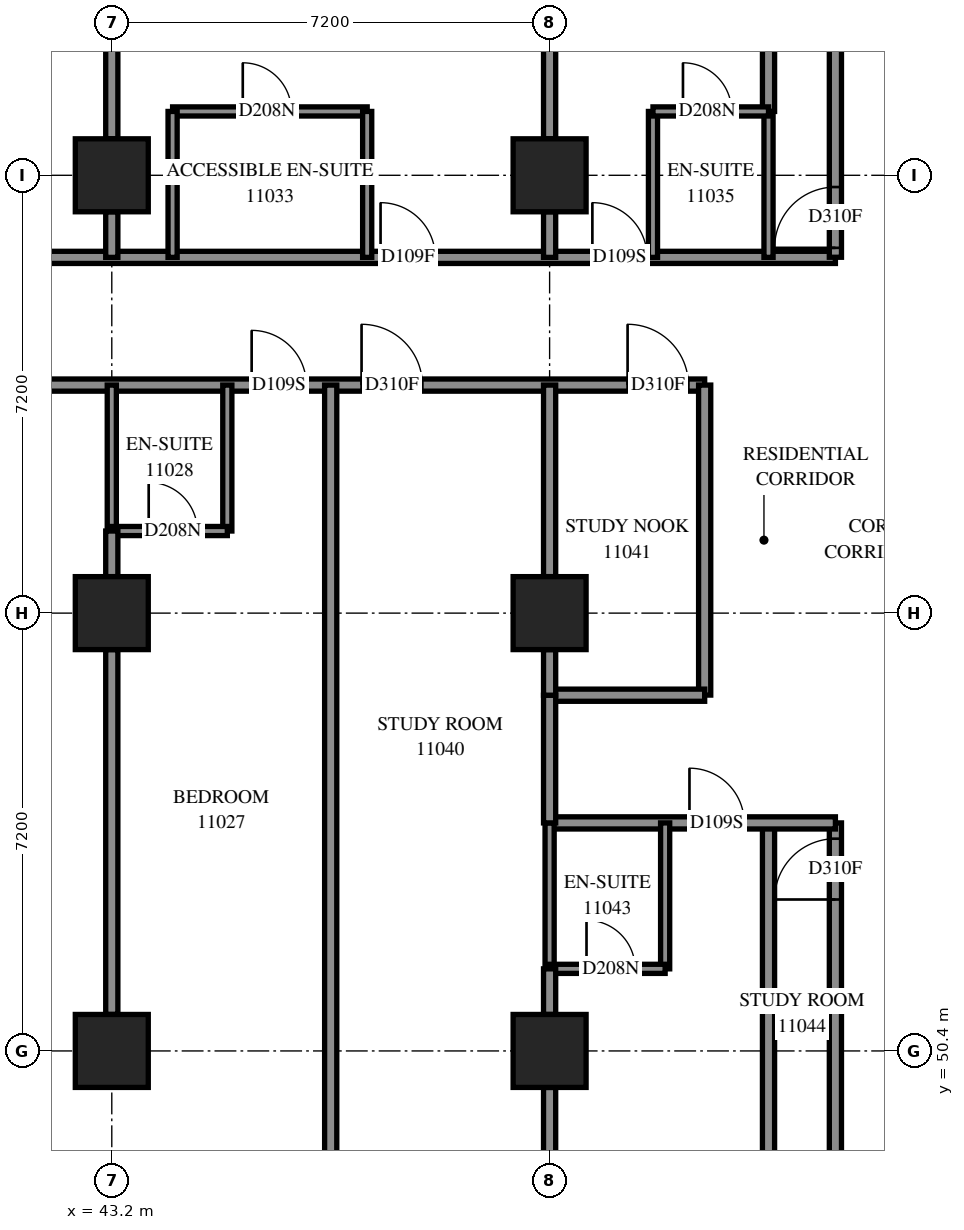
"""IFC4 building model, lengths in metres.
Left out: names, types, materials, properties, quantities, classifications, styles, units other than length and angle.
Written with IfcOpenShell. Run it as: python <this file> out.ifc"""

import sys

from ifc_helpers import new_model, si_unit, direction, frame, frame_2d, origin, origin_2d, place, context, subcontext, project, spatial, rectangle, extrude, element, fill, save


model = new_model("IFC4")
c1 = context("Model", 3, precision=1e-05, world=origin(), true_north=direction((0.0, 1.0)))
c2 = subcontext(c1, "Body", "Model", "MODEL_VIEW")
j1 = project(units=[si_unit("LENGTHUNIT", "METRE"), si_unit("PLANEANGLEUNIT", "RADIAN")], contexts=[c1])
p1 = place(None, origin())
s1 = spatial("IfcSite", under=j1, at=p1, CompositionType="ELEMENT")
p2 = place(p1, origin())
s2 = spatial("IfcBuilding", under=s1, at=p2, CompositionType="ELEMENT")
p3 = place(p2, frame((0.0, 0.0, 44.0)))
s3 = spatial("IfcBuildingStorey", under=s2, at=p3, CompositionType="ELEMENT", Elevation=44.0)
for number, where, z_axis, x_axis in (
    (1, (43.2, 50.4, 0.0), (0.0, 0.0, 1.0), (1.0, 0.0, 0.0)),
    (2, (43.2, 57.6, 0.0), (0.0, 0.0, 1.0), (1.0, 0.0, 0.0)),
    (3, (43.2, 64.8, 0.0), (0.0, 0.0, 1.0), (1.0, 0.0, 0.0)),
    (4, (50.4, 50.4, 0.0), (0.0, 0.0, 1.0), (1.0, 0.0, 0.0)),
    (5, (50.4, 57.6, 0.0), (0.0, 0.0, 1.0), (1.0, 0.0, 0.0)),
    (6, (50.4, 64.8, 0.0), (0.0, 0.0, 1.0), (1.0, 0.0, 0.0)),
):
    element("IfcColumn", number, at=place(p3, frame(where, z_axis=z_axis, x_axis=x_axis)), inside=s3, PredefinedType="COLUMN", context=c2, shape_type="SweptSolid", body=[
        extrude(rectangle(XDim=1.2, YDim=1.2, at=origin_2d()), origin(), (0.0, 0.0, 1.0), 3.1),
    ])
p4 = place(p3, frame((28.8, 61.35, 0.0), z_axis=(0.0, 0.0, 1.0), x_axis=(1.0, 0.0, 0.0)))
e7 = element("IfcWall", 7, at=p4, inside=s3, PredefinedType="PARTITIONING", context=c2, shape_type="SweptSolid", body=[
    extrude(rectangle(XDim=24.15, YDim=0.2, at=frame_2d((12.075, 0.0))), origin(), (0.0, 0.0, 1.0), 3.1),
])
p5 = place(p4, frame((2.3, 0.0, 0.0)))
e8 = element("IfcOpeningElement", 8, at=p5, cuts=e7, PredefinedType="OPENING", context=c2, shape_type="SweptSolid", body=[
    extrude(rectangle(XDim=0.9, YDim=2.1, at=frame_2d((0.45, 1.05))), frame((0.0, 0.11, 0.0), z_axis=(0.0, -1.0, 0.0), x_axis=(1.0, 0.0, 0.0)), (0.0, 0.0, 1.0), 0.22),
])
p6 = place(p4, frame((4.125, 0.0, 0.0)))
e9 = element("IfcOpeningElement", 9, at=p6, cuts=e7, PredefinedType="OPENING", context=c2, shape_type="SweptSolid", body=[
    extrude(rectangle(XDim=1.0, YDim=2.1, at=frame_2d((0.5, 1.05))), frame((0.0, 0.11, 0.0), z_axis=(0.0, -1.0, 0.0), x_axis=(1.0, 0.0, 0.0)), (0.0, 0.0, 1.0), 0.22),
])
p7 = place(p4, frame((11.061, 0.0, 0.0)))
e10 = element("IfcOpeningElement", 10, at=p7, cuts=e7, PredefinedType="OPENING", context=c2, shape_type="SweptSolid", body=[
    extrude(rectangle(XDim=0.9, YDim=2.1, at=frame_2d((0.45, 1.05))), frame((0.0, 0.11, 0.0), z_axis=(0.0, -1.0, 0.0), x_axis=(1.0, 0.0, 0.0)), (0.0, 0.0, 1.0), 0.22),
])
p8 = place(p4, frame((16.7, 0.0, 0.0)))
e11 = element("IfcOpeningElement", 11, at=p8, cuts=e7, PredefinedType="OPENING", context=c2, shape_type="SweptSolid", body=[
    extrude(rectangle(XDim=0.9, YDim=2.1, at=frame_2d((0.45, 1.05))), frame((0.0, 0.11, 0.0), z_axis=(0.0, -1.0, 0.0), x_axis=(1.0, 0.0, 0.0)), (0.0, 0.0, 1.0), 0.22),
])
p9 = place(p4, frame((18.508, 0.0, 0.0)))
e12 = element("IfcOpeningElement", 12, at=p9, cuts=e7, PredefinedType="OPENING", context=c2, shape_type="SweptSolid", body=[
    extrude(rectangle(XDim=1.0, YDim=2.1, at=frame_2d((0.5, 1.05))), frame((0.0, 0.11, 0.0), z_axis=(0.0, -1.0, 0.0), x_axis=(1.0, 0.0, 0.0)), (0.0, 0.0, 1.0), 0.22),
])
p10 = place(p4, frame((22.882, 0.0, 0.0)))
e13 = element("IfcOpeningElement", 13, at=p10, cuts=e7, PredefinedType="OPENING", context=c2, shape_type="SweptSolid", body=[
    extrude(rectangle(XDim=1.0, YDim=2.1, at=frame_2d((0.5, 1.05))), frame((0.0, 0.11, 0.0), z_axis=(0.0, -1.0, 0.0), x_axis=(1.0, 0.0, 0.0)), (0.0, 0.0, 1.0), 0.22),
])
p11 = place(p3, frame((33.452, 63.45, 0.0), z_axis=(0.0, 0.0, 1.0), x_axis=(1.0, 0.0, 0.0)))
e14 = element("IfcWall", 14, at=p11, inside=s3, PredefinedType="PARTITIONING", context=c2, shape_type="SweptSolid", body=[
    extrude(rectangle(XDim=21.648, YDim=0.2, at=frame_2d((10.824, 0.0))), origin(), (0.0, 0.0, 1.0), 3.1),
])
p12 = place(p11, frame((0.142, 0.0, 0.0)))
e15 = element("IfcOpeningElement", 15, at=p12, cuts=e14, PredefinedType="OPENING", context=c2, shape_type="SweptSolid", body=[
    extrude(rectangle(XDim=1.0, YDim=2.1, at=frame_2d((0.5, 1.05))), frame((0.0, 0.11, 0.0), z_axis=(0.0, -1.0, 0.0), x_axis=(1.0, 0.0, 0.0)), (0.0, 0.0, 1.0), 0.22),
])
p13 = place(p11, frame((6.412, 0.0, 0.0)))
e16 = element("IfcOpeningElement", 16, at=p13, cuts=e14, PredefinedType="OPENING", context=c2, shape_type="SweptSolid", body=[
    extrude(rectangle(XDim=0.9, YDim=2.1, at=frame_2d((0.45, 1.05))), frame((0.0, 0.11, 0.0), z_axis=(0.0, -1.0, 0.0), x_axis=(1.0, 0.0, 0.0)), (0.0, 0.0, 1.0), 0.22),
])
p14 = place(p11, frame((14.168, 0.0, 0.0)))
e17 = element("IfcOpeningElement", 17, at=p14, cuts=e14, PredefinedType="OPENING", context=c2, shape_type="SweptSolid", body=[
    extrude(rectangle(XDim=0.9, YDim=2.1, at=frame_2d((0.45, 1.05))), frame((0.0, 0.11, 0.0), z_axis=(0.0, -1.0, 0.0), x_axis=(1.0, 0.0, 0.0)), (0.0, 0.0, 1.0), 0.22),
])
p15 = place(p11, frame((17.651, 0.0, 0.0)))
e18 = element("IfcOpeningElement", 18, at=p15, cuts=e14, PredefinedType="OPENING", context=c2, shape_type="SweptSolid", body=[
    extrude(rectangle(XDim=0.9, YDim=2.1, at=frame_2d((0.45, 1.05))), frame((0.0, 0.11, 0.0), z_axis=(0.0, -1.0, 0.0), x_axis=(1.0, 0.0, 0.0)), (0.0, 0.0, 1.0), 0.22),
])
p16 = place(p3, frame((46.8, 48.699, 0.0), z_axis=(0.0, 0.0, 1.0), x_axis=(0.0, 1.0, 0.0)))
e19 = element("IfcWall", 19, at=p16, inside=s3, PredefinedType="PARTITIONING", context=c2, shape_type="SweptSolid", body=[
    extrude(rectangle(XDim=12.651, YDim=0.2, at=frame_2d((6.325, 0.0))), origin(), (0.0, 0.0, 1.0), 3.1),
])
p17 = place(p3, frame((54.0, 42.372, 0.0), z_axis=(0.0, 0.0, 1.0), x_axis=(0.0, 1.0, 0.0)))
e20 = element("IfcWall", 20, at=p17, inside=s3, PredefinedType="PARTITIONING", context=c2, shape_type="SweptSolid", body=[
    extrude(rectangle(XDim=11.778, YDim=0.2, at=frame_2d((5.889, 0.0))), origin(), (0.0, 0.0, 1.0), 3.1),
])
p18 = place(p3, frame((54.0, 65.85, 0.0), z_axis=(0.0, 0.0, 1.0), x_axis=(0.0, 1.0, 0.0)))
e21 = element("IfcWall", 21, at=p18, inside=s3, PredefinedType="PARTITIONING", context=c2, shape_type="SweptSolid", body=[
    extrude(rectangle(XDim=6.851, YDim=0.2, at=frame_2d((3.425, 0.0))), origin(), (0.0, 0.0, 1.0), 3.1),
])
p19 = place(p3, frame((55.1, 47.9, 0.0), z_axis=(0.0, 0.0, 1.0), x_axis=(0.0, 1.0, 0.0)))
e22 = element("IfcWall", 22, at=p19, inside=s3, PredefinedType="PARTITIONING", context=c2, shape_type="SweptSolid", body=[
    extrude(rectangle(XDim=6.25, YDim=0.2, at=frame_2d((3.125, 0.0))), origin(), (0.0, 0.0, 1.0), 3.1),
])
p20 = place(p19, frame((4.99, 0.0, 0.0)))
e23 = element("IfcOpeningElement", 23, at=p20, cuts=e22, PredefinedType="OPENING", context=c2, shape_type="SweptSolid", body=[
    extrude(rectangle(XDim=1.0, YDim=2.1, at=frame_2d((0.5, 1.05))), frame((0.0, 0.11, 0.0), z_axis=(0.0, -1.0, 0.0), x_axis=(1.0, 0.0, 0.0)), (0.0, 0.0, 1.0), 0.22),
])
p21 = place(p3, frame((43.2, 51.0, 0.0), z_axis=(0.0, 0.0, 1.0), x_axis=(0.0, 1.0, 0.0)))
e24 = element("IfcWall", 24, at=p21, inside=s3, PredefinedType="PARTITIONING", context=c2, shape_type="SweptSolid", body=[
    extrude(rectangle(XDim=6.0, YDim=0.2, at=frame_2d((3.0, 0.0))), origin(), (0.0, 0.0, 1.0), 2.6),
])
p22 = place(p3, frame((43.2, 65.4, 0.0), z_axis=(0.0, 0.0, 1.0), x_axis=(0.0, 1.0, 0.0)))
e25 = element("IfcWall", 25, at=p22, inside=s3, PredefinedType="PARTITIONING", context=c2, shape_type="SweptSolid", body=[
    extrude(rectangle(XDim=6.0, YDim=0.2, at=frame_2d((3.0, 0.0))), origin(), (0.0, 0.0, 1.0), 3.1),
])
p23 = place(p3, frame((50.4, 43.8, 0.0), z_axis=(0.0, 0.0, 1.0), x_axis=(0.0, 1.0, 0.0)))
e26 = element("IfcWall", 26, at=p23, inside=s3, PredefinedType="PARTITIONING", context=c2, shape_type="SweptSolid", body=[
    extrude(rectangle(XDim=6.0, YDim=0.2, at=frame_2d((3.0, 0.0))), origin(), (0.0, 0.0, 1.0), 2.6),
])
p24 = place(p3, frame((50.4, 65.4, 0.0), z_axis=(0.0, 0.0, 1.0), x_axis=(0.0, 1.0, 0.0)))
e27 = element("IfcWall", 27, at=p24, inside=s3, PredefinedType="PARTITIONING", context=c2, shape_type="SweptSolid", body=[
    extrude(rectangle(XDim=6.0, YDim=0.2, at=frame_2d((3.0, 0.0))), origin(), (0.0, 0.0, 1.0), 3.1),
])
p25 = place(p3, frame((52.95, 56.252, 0.0), z_axis=(0.0, 0.0, 1.0), x_axis=(0.0, 1.0, 0.0)))
e28 = element("IfcWall", 28, at=p25, inside=s3, PredefinedType="PARTITIONING", context=c2, shape_type="SweptSolid", body=[
    extrude(rectangle(XDim=5.098, YDim=0.2, at=frame_2d((2.549, 0.0))), origin(), (0.0, 0.0, 1.0), 3.1),
])
p26 = place(p3, frame((50.4, 54.15, 0.0), z_axis=(0.0, 0.0, 1.0), x_axis=(1.0, 0.0, 0.0)))
e29 = element("IfcWall", 29, at=p26, inside=s3, PredefinedType="PARTITIONING", context=c2, shape_type="SweptSolid", body=[
    extrude(rectangle(XDim=4.7, YDim=0.2, at=frame_2d((2.35, 0.0))), origin(), (0.0, 0.0, 1.0), 3.1),
])
p27 = place(p26, frame((2.3, 0.0, 0.0)))
e30 = element("IfcOpeningElement", 30, at=p27, cuts=e29, PredefinedType="OPENING", context=c2, shape_type="SweptSolid", body=[
    extrude(rectangle(XDim=0.9, YDim=2.1, at=frame_2d((0.45, 1.05))), frame((0.0, 0.11, 0.0), z_axis=(0.0, -1.0, 0.0), x_axis=(1.0, 0.0, 0.0)), (0.0, 0.0, 1.0), 0.22),
])
p28 = place(p3, frame((55.1, 63.452, 0.0), z_axis=(0.0, 0.0, 1.0), x_axis=(0.0, 1.0, 0.0)))
e31 = element("IfcWall", 31, at=p28, inside=s3, PredefinedType="PARTITIONING", context=c2, shape_type="SweptSolid", body=[
    extrude(rectangle(XDim=3.848, YDim=0.2, at=frame_2d((1.924, 0.0))), origin(), (0.0, 0.0, 1.0), 3.1),
])
p29 = place(p28, frame((0.155, 0.0, 0.0)))
e32 = element("IfcOpeningElement", 32, at=p29, cuts=e31, PredefinedType="OPENING", context=c2, shape_type="SweptSolid", body=[
    extrude(rectangle(XDim=1.0, YDim=2.1, at=frame_2d((0.5, 1.05))), frame((0.0, 0.11, 0.0), z_axis=(0.0, -1.0, 0.0), x_axis=(1.0, 0.0, 0.0)), (0.0, 0.0, 1.0), 0.22),
])
p30 = place(p3, frame((44.2, 65.85, 0.0), z_axis=(0.0, 0.0, 1.0), x_axis=(1.0, 0.0, 0.0)))
e33 = element("IfcWall", 33, at=p30, inside=s3, PredefinedType="PARTITIONING", context=c2, shape_type="SweptSolid", body=[
    extrude(rectangle(XDim=3.2, YDim=0.15, at=frame_2d((1.6, 0.0))), origin(), (0.0, 0.0, 1.0), 3.1),
])
p31 = place(p30, frame((1.154, 0.0, 0.0)))
e34 = element("IfcOpeningElement", 34, at=p31, cuts=e33, PredefinedType="OPENING", context=c2, shape_type="SweptSolid", body=[
    extrude(rectangle(XDim=0.8, YDim=2.1, at=frame_2d((0.4, 1.05))), frame((0.0, 0.085, 0.0), z_axis=(0.0, -1.0, 0.0), x_axis=(1.0, 0.0, 0.0)), (0.0, 0.0, 1.0), 0.17),
])
p32 = place(p3, frame((50.4, 58.2, 0.0), z_axis=(0.0, 0.0, 1.0), x_axis=(0.0, 1.0, 0.0)))
e35 = element("IfcWall", 35, at=p32, inside=s3, PredefinedType="PARTITIONING", context=c2, shape_type="SweptSolid", body=[
    extrude(rectangle(XDim=3.15, YDim=0.2, at=frame_2d((1.575, 0.0))), origin(), (0.0, 0.0, 1.0), 3.1),
])
p33 = place(p3, frame((50.4, 56.25, 0.0), z_axis=(0.0, 0.0, 1.0), x_axis=(1.0, 0.0, 0.0)))
e36 = element("IfcWall", 36, at=p33, inside=s3, PredefinedType="PARTITIONING", context=c2, shape_type="SweptSolid", body=[
    extrude(rectangle(XDim=2.55, YDim=0.2, at=frame_2d((1.275, 0.0))), origin(), (0.0, 0.0, 1.0), 3.1),
])
for number, where, z_axis, x_axis in (
    (37, (45.1, 58.95, 0.0), (0.0, 0.0, 1.0), (0.0, 1.0, 0.0)),
    (38, (43.2, 58.95, 0.0), (0.0, 0.0, 1.0), (0.0, 1.0, 0.0)),
    (39, (52.3, 51.75, 0.0), (0.0, 0.0, 1.0), (0.0, 1.0, 0.0)),
    (40, (50.4, 51.75, 0.0), (0.0, 0.0, 1.0), (0.0, 1.0, 0.0)),
    (41, (44.2, 63.45, 0.0), (0.0, 0.0, 1.0), (0.0, 1.0, 0.0)),
    (42, (47.4, 63.45, 0.0), (0.0, 0.0, 1.0), (0.0, 1.0, 0.0)),
    (43, (52.1, 63.45, 0.0), (0.0, 0.0, 1.0), (0.0, 1.0, 0.0)),
    (44, (54.0, 63.45, 0.0), (0.0, 0.0, 1.0), (0.0, 1.0, 0.0)),
):
    element("IfcWall", number, at=place(p3, frame(where, z_axis=z_axis, x_axis=x_axis)), inside=s3, PredefinedType="PARTITIONING", context=c2, shape_type="SweptSolid", body=[
        extrude(rectangle(XDim=2.4, YDim=0.15, at=frame_2d((1.2, 0.0))), origin(), (0.0, 0.0, 1.0), 3.1),
    ])
p34 = place(p3, frame((50.4, 54.15, 0.0), z_axis=(0.0, 0.0, 1.0), x_axis=(0.0, 1.0, 0.0)))
e45 = element("IfcWall", 45, at=p34, inside=s3, PredefinedType="PARTITIONING", context=c2, shape_type="SweptSolid", body=[
    extrude(rectangle(XDim=2.1, YDim=0.2, at=frame_2d((1.05, 0.0))), origin(), (0.0, 0.0, 1.0), 3.1),
])
p35 = place(p3, frame((43.2, 58.95, 0.0), z_axis=(0.0, 0.0, 1.0), x_axis=(1.0, 0.0, 0.0)))
e46 = element("IfcWall", 46, at=p35, inside=s3, PredefinedType="PARTITIONING", context=c2, shape_type="SweptSolid", body=[
    extrude(rectangle(XDim=1.9, YDim=0.15, at=frame_2d((0.95, 0.0))), origin(), (0.0, 0.0, 1.0), 3.1),
])
p36 = place(p35, frame((0.607, 0.0, 0.0)))
e47 = element("IfcOpeningElement", 47, at=p36, cuts=e46, PredefinedType="OPENING", context=c2, shape_type="SweptSolid", body=[
    extrude(rectangle(XDim=0.8, YDim=2.1, at=frame_2d((0.4, 1.05))), frame((0.0, 0.085, 0.0), z_axis=(0.0, -1.0, 0.0), x_axis=(1.0, 0.0, 0.0)), (0.0, 0.0, 1.0), 0.17),
])
p37 = place(p3, frame((52.1, 65.85, 0.0), z_axis=(0.0, 0.0, 1.0), x_axis=(1.0, 0.0, 0.0)))
e48 = element("IfcWall", 48, at=p37, inside=s3, PredefinedType="PARTITIONING", context=c2, shape_type="SweptSolid", body=[
    extrude(rectangle(XDim=1.9, YDim=0.15, at=frame_2d((0.95, 0.0))), origin(), (0.0, 0.0, 1.0), 3.1),
])
p38 = place(p37, frame((0.493, 0.0, 0.0)))
e49 = element("IfcOpeningElement", 49, at=p38, cuts=e48, PredefinedType="OPENING", context=c2, shape_type="SweptSolid", body=[
    extrude(rectangle(XDim=0.8, YDim=2.1, at=frame_2d((0.4, 1.05))), frame((0.0, 0.085, 0.0), z_axis=(0.0, -1.0, 0.0), x_axis=(1.0, 0.0, 0.0)), (0.0, 0.0, 1.0), 0.17),
])
p39 = place(p3, frame((50.4, 51.75, 0.0), z_axis=(0.0, 0.0, 1.0), x_axis=(1.0, 0.0, 0.0)))
e50 = element("IfcWall", 50, at=p39, inside=s3, PredefinedType="PARTITIONING", context=c2, shape_type="SweptSolid", body=[
    extrude(rectangle(XDim=1.9, YDim=0.15, at=frame_2d((0.95, 0.0))), origin(), (0.0, 0.0, 1.0), 3.1),
])
p40 = place(p39, frame((0.607, 0.0, 0.0)))
e51 = element("IfcOpeningElement", 51, at=p40, cuts=e50, PredefinedType="OPENING", context=c2, shape_type="SweptSolid", body=[
    extrude(rectangle(XDim=0.8, YDim=2.1, at=frame_2d((0.4, 1.05))), frame((0.0, 0.085, 0.0), z_axis=(0.0, -1.0, 0.0), x_axis=(1.0, 0.0, 0.0)), (0.0, 0.0, 1.0), 0.17),
])
for number, where, z_axis, x_axis in (
    (52, (43.2, 58.2, 0.0), (0.0, 0.0, 1.0), (0.0, 1.0, 0.0)),
    (53, (43.2, 63.45, 0.0), (0.0, 0.0, 1.0), (0.0, 1.0, 0.0)),
    (54, (50.4, 51.0, 0.0), (0.0, 0.0, 1.0), (0.0, 1.0, 0.0)),
    (55, (50.4, 56.25, 0.0), (0.0, 0.0, 1.0), (0.0, 1.0, 0.0)),
    (56, (50.4, 63.45, 0.0), (0.0, 0.0, 1.0), (0.0, 1.0, 0.0)),
):
    element("IfcWall", number, at=place(p3, frame(where, z_axis=z_axis, x_axis=x_axis)), inside=s3, PredefinedType="PARTITIONING", context=c2, shape_type="SweptSolid", body=[
        extrude(rectangle(XDim=0.75, YDim=0.2, at=frame_2d((0.375, 0.0))), origin(), (0.0, 0.0, 1.0), 3.1),
    ])
p41 = place(p8, origin())
e57 = element("IfcDoor", 57, at=p41, inside=s3, OperationType="SINGLE_SWING_LEFT", PredefinedType="DOOR", context=c2, shape_type="SweptSolid", body=[
    extrude(rectangle(XDim=0.9, YDim=2.1, at=frame_2d((0.45, 1.05))), frame((0.0, 0.025, 0.0), z_axis=(0.0, -1.0, 0.0), x_axis=(1.0, 0.0, 0.0)), (0.0, 0.0, 1.0), 0.05),
])
fill(e11, e57)
p42 = place(p36, origin())
e58 = element("IfcDoor", 58, at=p42, inside=s3, OperationType="SINGLE_SWING_RIGHT", PredefinedType="DOOR", context=c2, shape_type="SweptSolid", body=[
    extrude(rectangle(XDim=0.8, YDim=2.1, at=frame_2d((0.4, 1.05))), frame((0.0, 0.025, 0.0), z_axis=(0.0, -1.0, 0.0), x_axis=(1.0, 0.0, 0.0)), (0.0, 0.0, 1.0), 0.05),
])
fill(e47, e58)
p43 = place(p14, origin())
e59 = element("IfcDoor", 59, at=p43, inside=s3, OperationType="SINGLE_SWING_RIGHT", PredefinedType="DOOR", context=c2, shape_type="SweptSolid", body=[
    extrude(rectangle(XDim=0.9, YDim=2.1, at=frame_2d((0.45, 1.05))), frame((0.0, 0.025, 0.0), z_axis=(0.0, -1.0, 0.0), x_axis=(1.0, 0.0, 0.0)), (0.0, 0.0, 1.0), 0.05),
])
fill(e17, e59)
p44 = place(p31, origin())
e60 = element("IfcDoor", 60, at=p44, inside=s3, OperationType="SINGLE_SWING_RIGHT", PredefinedType="DOOR", context=c2, shape_type="SweptSolid", body=[
    extrude(rectangle(XDim=0.8, YDim=2.1, at=frame_2d((0.4, 1.05))), frame((0.0, 0.025, 0.0), z_axis=(0.0, -1.0, 0.0), x_axis=(1.0, 0.0, 0.0)), (0.0, 0.0, 1.0), 0.05),
])
fill(e34, e60)
p45 = place(p15, origin())
e61 = element("IfcDoor", 61, at=p45, inside=s3, OperationType="SINGLE_SWING_RIGHT", PredefinedType="DOOR", context=c2, shape_type="SweptSolid", body=[
    extrude(rectangle(XDim=0.9, YDim=2.1, at=frame_2d((0.45, 1.05))), frame((0.0, 0.025, 0.0), z_axis=(0.0, -1.0, 0.0), x_axis=(1.0, 0.0, 0.0)), (0.0, 0.0, 1.0), 0.05),
])
fill(e18, e61)
p46 = place(p38, origin())
e62 = element("IfcDoor", 62, at=p46, inside=s3, OperationType="SINGLE_SWING_RIGHT", PredefinedType="DOOR", context=c2, shape_type="SweptSolid", body=[
    extrude(rectangle(XDim=0.8, YDim=2.1, at=frame_2d((0.4, 1.05))), frame((0.0, 0.025, 0.0), z_axis=(0.0, -1.0, 0.0), x_axis=(1.0, 0.0, 0.0)), (0.0, 0.0, 1.0), 0.05),
])
fill(e49, e62)
p47 = place(p29, origin())
e63 = element("IfcDoor", 63, at=p47, inside=s3, OperationType="SINGLE_SWING_LEFT", PredefinedType="DOOR", context=c2, shape_type="SweptSolid", body=[
    extrude(rectangle(XDim=1.0, YDim=2.1, at=frame_2d((0.5, 1.05))), frame((0.0, 0.025, 0.0), z_axis=(0.0, -1.0, 0.0), x_axis=(1.0, 0.0, 0.0)), (0.0, 0.0, 1.0), 0.05),
])
fill(e32, e63)
p48 = place(p9, origin())
e64 = element("IfcDoor", 64, at=p48, inside=s3, OperationType="SINGLE_SWING_RIGHT", PredefinedType="DOOR", context=c2, shape_type="SweptSolid", body=[
    extrude(rectangle(XDim=1.0, YDim=2.1, at=frame_2d((0.5, 1.05))), frame((0.0, 0.025, 0.0), z_axis=(0.0, -1.0, 0.0), x_axis=(1.0, 0.0, 0.0)), (0.0, 0.0, 1.0), 0.05),
])
fill(e12, e64)
p49 = place(p10, origin())
e65 = element("IfcDoor", 65, at=p49, inside=s3, OperationType="SINGLE_SWING_LEFT", PredefinedType="DOOR", context=c2, shape_type="SweptSolid", body=[
    extrude(rectangle(XDim=1.0, YDim=2.1, at=frame_2d((0.5, 1.05))), frame((0.0, 0.025, 0.0), z_axis=(0.0, -1.0, 0.0), x_axis=(1.0, 0.0, 0.0)), (0.0, 0.0, 1.0), 0.05),
])
fill(e13, e65)
p50 = place(p27, origin())
e66 = element("IfcDoor", 66, at=p50, inside=s3, OperationType="SINGLE_SWING_LEFT", PredefinedType="DOOR", context=c2, shape_type="SweptSolid", body=[
    extrude(rectangle(XDim=0.9, YDim=2.1, at=frame_2d((0.45, 1.05))), frame((0.0, 0.025, 0.0), z_axis=(0.0, -1.0, 0.0), x_axis=(1.0, 0.0, 0.0)), (0.0, 0.0, 1.0), 0.05),
])
fill(e30, e66)
p51 = place(p40, origin())
e67 = element("IfcDoor", 67, at=p51, inside=s3, OperationType="SINGLE_SWING_RIGHT", PredefinedType="DOOR", context=c2, shape_type="SweptSolid", body=[
    extrude(rectangle(XDim=0.8, YDim=2.1, at=frame_2d((0.4, 1.05))), frame((0.0, 0.025, 0.0), z_axis=(0.0, -1.0, 0.0), x_axis=(1.0, 0.0, 0.0)), (0.0, 0.0, 1.0), 0.05),
])
fill(e51, e67)
p52 = place(p20, origin())
e68 = element("IfcDoor", 68, at=p52, inside=s3, OperationType="SINGLE_SWING_RIGHT", PredefinedType="DOOR", context=c2, shape_type="SweptSolid", body=[
    extrude(rectangle(XDim=1.0, YDim=2.1, at=frame_2d((0.5, 1.05))), frame((0.0, 0.025, 0.0), z_axis=(0.0, -1.0, 0.0), x_axis=(1.0, 0.0, 0.0)), (0.0, 0.0, 1.0), 0.05),
])
fill(e23, e68)
save(model, sys.argv[1])
